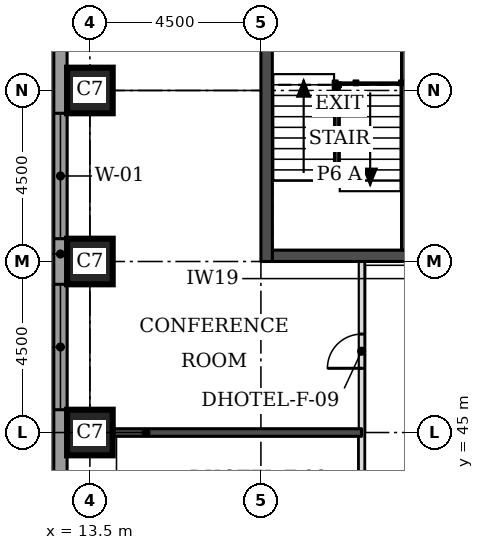
"""IFC4 building model, lengths in metres.
Left out: names, types, materials, properties, quantities, classifications, styles, units other than length and angle.
Written with IfcOpenShell. Run it as: python <this file> out.ifc"""

import sys

from ifc_helpers import new_model, si_unit, direction, frame, frame_2d, origin, origin_2d, place, context, subcontext, project, spatial, rectangle, extrude, element, fill, save


model = new_model("IFC4")
c1 = context("Model", 3, precision=1e-05, world=origin(), true_north=direction((0.0, 1.0)))
c2 = subcontext(c1, "Body", "Model", "MODEL_VIEW")
j1 = project(units=[si_unit("LENGTHUNIT", "METRE"), si_unit("PLANEANGLEUNIT", "RADIAN")], contexts=[c1])
p1 = place(None, origin())
s1 = spatial("IfcSite", under=j1, at=p1, CompositionType="ELEMENT")
p2 = place(p1, origin())
s2 = spatial("IfcBuilding", under=s1, at=p2, CompositionType="ELEMENT")
p3 = place(p2, frame((0.0, 0.0, 42.9)))
s3 = spatial("IfcBuildingStorey", under=s2, at=p3, CompositionType="ELEMENT", Elevation=42.9)
for number, where, z_axis, x_axis in (
    (1, (13.5, 45.0, 0.0), (0.0, 0.0, 1.0), (1.0, 0.0, 0.0)),
    (2, (13.5, 49.5, 0.0), (0.0, 0.0, 1.0), (1.0, 0.0, 0.0)),
    (3, (13.5, 54.0, 0.0), (0.0, 0.0, 1.0), (1.0, 0.0, 0.0)),
):
    element("IfcColumn", number, at=place(p3, frame(where, z_axis=z_axis, x_axis=x_axis)), inside=s3, PredefinedType="COLUMN", context=c2, shape_type="SweptSolid", body=[
        extrude(rectangle(XDim=1.2, YDim=1.2, at=origin_2d()), origin(), (0.0, 0.0, 1.0), 3.3),
    ])
p4 = place(p3, frame((18.3, 49.65, 0.0), z_axis=(0.0, 0.0, 1.0), x_axis=(1.0, 0.0, 0.0)))
e4 = element("IfcWall", 4, at=p4, inside=s3, PredefinedType="SHEAR", context=c2, shape_type="SweptSolid", body=[
    extrude(rectangle(XDim=8.4, YDim=0.3, at=frame_2d((4.2, 0.0))), origin(), (0.0, 0.0, 1.0), 3.3),
])
p5 = place(p3, frame((18.15, 49.5, 0.0), z_axis=(0.0, 0.0, 1.0), x_axis=(0.0, 1.0, 0.0)))
e5 = element("IfcWall", 5, at=p5, inside=s3, PredefinedType="SHEAR", context=c2, shape_type="SweptSolid", body=[
    extrude(rectangle(XDim=9.0, YDim=0.3, at=frame_2d((4.5, 0.0))), origin(), (0.0, 0.0, 1.0), 3.3),
])
p6 = place(p3, frame((12.725, 58.894, 0.0), z_axis=(0.0, 0.0, 1.0), x_axis=(0.0, -1.0, 0.0)))
e6 = element("IfcWall", 6, at=p6, inside=s3, PredefinedType="STANDARD", context=c2, shape_type="SweptSolid", body=[
    extrude(rectangle(XDim=18.394, YDim=0.35, at=frame_2d((9.197, 0.0))), origin(), (0.0, 0.0, 1.0), 3.055),
])
p7 = place(p6, frame((5.493, 0.0, 0.8)))
e7 = element("IfcOpeningElement", 7, at=p7, cuts=e6, PredefinedType="OPENING", context=c2, shape_type="SweptSolid", body=[
    extrude(rectangle(XDim=3.3, YDim=1.5, at=frame_2d((1.65, 0.75))), frame((0.0, 0.185, 0.0), z_axis=(0.0, -1.0, 0.0), x_axis=(1.0, 0.0, 0.0)), (0.0, 0.0, 1.0), 0.37),
])
p8 = place(p6, frame((9.993, 0.0, 0.8)))
e8 = element("IfcOpeningElement", 8, at=p8, cuts=e6, PredefinedType="OPENING", context=c2, shape_type="SweptSolid", body=[
    extrude(rectangle(XDim=3.3, YDim=1.5, at=frame_2d((1.65, 0.75))), frame((0.0, 0.185, 0.0), z_axis=(0.0, -1.0, 0.0), x_axis=(1.0, 0.0, 0.0)), (0.0, 0.0, 1.0), 0.37),
])
p9 = place(p3, frame((20.65, 23.65, 0.0), z_axis=(0.0, 0.0, 1.0), x_axis=(0.0, 1.0, 0.0)))
e9 = element("IfcWall", 9, at=p9, inside=s3, PredefinedType="PARTITIONING", context=c2, shape_type="SweptSolid", body=[
    extrude(rectangle(XDim=25.85, YDim=0.15, at=frame_2d((12.925, 0.0))), origin(), (0.0, 0.0, 1.0), 3.08),
])
p10 = place(p9, frame((1.9, 0.0, 0.0)))
e10 = element("IfcOpeningElement", 10, at=p10, cuts=e9, PredefinedType="OPENING", context=c2, shape_type="SweptSolid", body=[
    extrude(rectangle(XDim=1.0, YDim=2.1, at=frame_2d((0.5, 1.05))), frame((0.0, 0.085, 0.0), z_axis=(0.0, -1.0, 0.0), x_axis=(1.0, 0.0, 0.0)), (0.0, 0.0, 1.0), 0.17),
])
p11 = place(p9, frame((6.0, 0.0, 0.0)))
e11 = element("IfcOpeningElement", 11, at=p11, cuts=e9, PredefinedType="OPENING", context=c2, shape_type="SweptSolid", body=[
    extrude(rectangle(XDim=1.0, YDim=2.1, at=frame_2d((0.5, 1.05))), frame((0.0, 0.085, 0.0), z_axis=(0.0, -1.0, 0.0), x_axis=(1.0, 0.0, 0.0)), (0.0, 0.0, 1.0), 0.17),
])
p12 = place(p9, frame((17.95, 0.0, 0.0)))
e12 = element("IfcOpeningElement", 12, at=p12, cuts=e9, PredefinedType="OPENING", context=c2, shape_type="SweptSolid", body=[
    extrude(rectangle(XDim=1.0, YDim=2.1, at=frame_2d((0.5, 1.05))), frame((0.0, 0.085, 0.0), z_axis=(0.0, -1.0, 0.0), x_axis=(1.0, 0.0, 0.0)), (0.0, 0.0, 1.0), 0.17),
])
p13 = place(p9, frame((23.04, 0.0, 0.0)))
e13 = element("IfcOpeningElement", 13, at=p13, cuts=e9, PredefinedType="OPENING", context=c2, shape_type="SweptSolid", body=[
    extrude(rectangle(XDim=0.9, YDim=2.1, at=frame_2d((0.45, 1.05))), frame((0.0, 0.085, 0.0), z_axis=(0.0, -1.0, 0.0), x_axis=(1.0, 0.0, 0.0)), (0.0, 0.0, 1.0), 0.17),
])
p14 = place(p3, frame((14.1, 45.0, 0.0), z_axis=(0.0, 0.0, 1.0), x_axis=(1.0, 0.0, 0.0)))
e14 = element("IfcWall", 14, at=p14, inside=s3, PredefinedType="SOLIDWALL", context=c2, shape_type="SweptSolid", body=[
    extrude(rectangle(XDim=6.55, YDim=0.2, at=frame_2d((3.275, 0.0))), origin(), (0.0, 0.0, 1.0), 3.08),
])
p15 = place(p3, frame((21.8, 49.8, 0.0), z_axis=(0.0, 0.0, 1.0), x_axis=(0.0, 1.0, 0.0)))
e15 = element("IfcWall", 15, at=p15, inside=s3, PredefinedType="SOLIDWALL", context=c2, shape_type="SweptSolid", body=[
    extrude(rectangle(XDim=6.05, YDim=0.2, at=frame_2d((3.025, 0.0))), origin(), (0.0, 0.0, 1.0), 3.08),
])
p16 = place(p7, origin())
e16 = element("IfcWindow", 16, at=p16, inside=s3, PartitioningType="SINGLE_PANEL", PredefinedType="WINDOW", context=c2, shape_type="SweptSolid", body=[
    extrude(rectangle(XDim=3.3, YDim=1.5, at=frame_2d((1.65, 0.75))), frame((0.0, 0.085, 0.0), z_axis=(0.0, -1.0, 0.0), x_axis=(1.0, 0.0, 0.0)), (0.0, 0.0, 1.0), 0.06),
])
fill(e7, e16)
p17 = place(p8, origin())
e17 = element("IfcWindow", 17, at=p17, inside=s3, PartitioningType="SINGLE_PANEL", PredefinedType="WINDOW", context=c2, shape_type="SweptSolid", body=[
    extrude(rectangle(XDim=3.3, YDim=1.5, at=frame_2d((1.65, 0.75))), frame((0.0, 0.085, 0.0), z_axis=(0.0, -1.0, 0.0), x_axis=(1.0, 0.0, 0.0)), (0.0, 0.0, 1.0), 0.06),
])
fill(e8, e17)
p18 = place(p13, origin())
e18 = element("IfcDoor", 18, at=p18, inside=s3, OperationType="SINGLE_SWING_LEFT", PredefinedType="DOOR", context=c2, shape_type="SweptSolid", body=[
    extrude(rectangle(XDim=0.9, YDim=2.1, at=frame_2d((0.45, 1.05))), frame((0.0, 0.025, 0.0), z_axis=(0.0, -1.0, 0.0), x_axis=(1.0, 0.0, 0.0)), (0.0, 0.0, 1.0), 0.05),
])
fill(e13, e18)
save(model, sys.argv[1])
